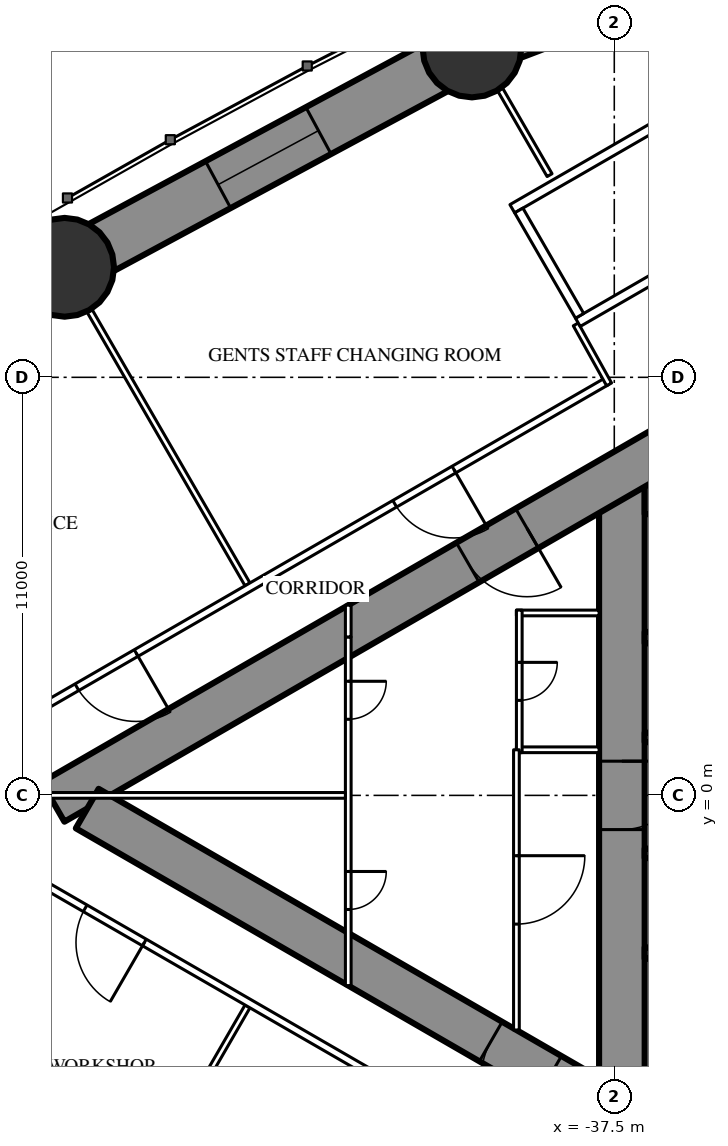
"""IFC4 building model, lengths in metres.
Left out: names, types, materials, properties, quantities, classifications, styles, units other than length and angle.
Written with IfcOpenShell. Run it as: python <this file> out.ifc"""

import sys

from ifc_helpers import new_model, si_unit, direction, frame, frame_2d, origin, origin_2d, place, context, subcontext, project, spatial, rectangle, hollow_circle, extrude, element, fill, save


model = new_model("IFC4")
c1 = context("Model", 3, precision=1e-05, world=origin(), true_north=direction((0.0, 1.0)))
c2 = subcontext(c1, "Body", "Model", "MODEL_VIEW")
j1 = project(units=[si_unit("LENGTHUNIT", "METRE"), si_unit("PLANEANGLEUNIT", "RADIAN")], contexts=[c1])
p1 = place(None, origin())
s1 = spatial("IfcSite", under=j1, at=p1, CompositionType="ELEMENT")
p2 = place(p1, origin())
s2 = spatial("IfcBuilding", under=s1, at=p2, CompositionType="ELEMENT")
p3 = place(p2, frame((0.0, 0.0, 143.1)))
s3 = spatial("IfcBuildingStorey", under=s2, at=p3, CompositionType="ELEMENT", Elevation=143.1)
for number, where, z_axis, x_axis in (
    (1, (-41.245, 19.666, 0.0), (0.0, 0.0, 1.0), (1.0, 0.0, 0.0)),
    (2, (-51.963, 13.895, 0.0), (0.0, 0.0, 1.0), (1.0, 0.0, 0.0)),
):
    element("IfcColumn", number, at=place(p3, frame(where, z_axis=z_axis, x_axis=x_axis)), inside=s3, PredefinedType="COLUMN", context=c2, shape_type="SweptSolid", body=[
        extrude(hollow_circle(Radius=1.3, WallThickness=0.1, at=origin_2d()), origin(), (0.0, 0.0, 1.0), 3.6),
    ])
p4 = place(p3, frame((-37.3, 8.6, 0.0), z_axis=(0.0, 0.0, 1.0), x_axis=(0.0, -1.0, 0.0)))
e3 = element("IfcWall", 3, at=p4, inside=s3, PredefinedType="SHEAR", context=c2, shape_type="SweptSolid", body=[
    extrude(rectangle(XDim=17.2, YDim=1.2, at=frame_2d((8.6, 0.0))), origin(), (0.0, 0.0, 1.0), 3.6),
])
p5 = place(p4, frame((7.7, 0.0, 0.0)))
e4 = element("IfcOpeningElement", 4, at=p5, cuts=e3, PredefinedType="OPENING", context=c2, shape_type="SweptSolid", body=[
    extrude(rectangle(XDim=1.8, YDim=2.2, at=frame_2d((0.9, 1.1))), frame((0.0, 0.61, 0.0), z_axis=(0.0, -1.0, 0.0), x_axis=(1.0, 0.0, 0.0)), (0.0, 0.0, 1.0), 1.22),
])
p6 = place(p3, frame((-28.3, 8.0, 0.0), z_axis=(0.0, 0.0, 1.0), x_axis=(-1.0, 0.0, 0.0)))
e5 = element("IfcWall", 5, at=p6, inside=s3, PredefinedType="SHEAR", context=c2, shape_type="SweptSolid", body=[
    extrude(rectangle(XDim=8.4, YDim=1.2, at=frame_2d((4.2, 0.0))), origin(), (0.0, 0.0, 1.0), 3.6),
])
p7 = place(p6, frame((0.25, 0.0, 0.0)))
e6 = element("IfcOpeningElement", 6, at=p7, cuts=e5, PredefinedType="OPENING", context=c2, shape_type="SweptSolid", body=[
    extrude(rectangle(XDim=1.0, YDim=2.2, at=frame_2d((0.5, 1.1))), frame((0.0, 0.61, 0.0), z_axis=(0.0, -1.0, 0.0), x_axis=(1.0, 0.0, 0.0)), (0.0, 0.0, 1.0), 1.22),
])
for number, where, z_axis, x_axis in (
    (7, (-28.3, 4.15, 0.0), (0.0, 0.0, 1.0), (-1.0, 0.0, 0.0)),
    (8, (-28.3, -4.15, 0.0), (0.0, 0.0, 1.0), (-1.0, 0.0, 0.0)),
):
    element("IfcWall", number, at=place(p3, frame(where, z_axis=z_axis, x_axis=x_axis)), inside=s3, PredefinedType="SHEAR", context=c2, shape_type="SweptSolid", body=[
        extrude(rectangle(XDim=8.4, YDim=0.3, at=frame_2d((4.2, 0.0))), origin(), (0.0, 0.0, 1.0), 3.6),
    ])
for number, where, z_axis, x_axis in (
    (9, (-34.25, 1.525, 0.0), (0.0, 0.0, 1.0), (-1.0, 0.0, 0.0)),
    (10, (-34.25, -1.525, 0.0), (0.0, 0.0, 1.0), (-1.0, 0.0, 0.0)),
):
    element("IfcWall", number, at=place(p3, frame(where, z_axis=z_axis, x_axis=x_axis)), inside=s3, PredefinedType="SHEAR", context=c2, shape_type="SweptSolid", body=[
        extrude(rectangle(XDim=2.45, YDim=0.25, at=frame_2d((1.225, 0.0))), origin(), (0.0, 0.0, 1.0), 3.6),
    ])
p8 = place(p3, frame((-27.2, 14.3, 0.0), z_axis=(0.0, 0.0, 1.0), x_axis=(-0.866026593062, -0.499997940104, 0.0)))
e11 = element("IfcWall", 11, at=p8, inside=s3, PredefinedType="SHEAR", context=c2, shape_type="SweptSolid", body=[
    extrude(rectangle(XDim=28.946, YDim=1.2, at=frame_2d((14.473, 0.0))), origin(), (0.0, 0.0, 1.0), 3.6),
])
p9 = place(p8, frame((4.6, 0.0, 0.0)))
e12 = element("IfcOpeningElement", 12, at=p9, cuts=e11, PredefinedType="OPENING", context=c2, shape_type="SweptSolid", body=[
    extrude(rectangle(XDim=1.0, YDim=2.2, at=frame_2d((0.5, 1.1))), frame((0.0, 0.61, 0.0), z_axis=(0.0, -1.0, 0.0), x_axis=(1.0, 0.0, 0.0)), (0.0, 0.0, 1.0), 1.22),
])
p10 = place(p8, frame((14.545, 0.0, 0.0)))
e13 = element("IfcOpeningElement", 13, at=p10, cuts=e11, PredefinedType="OPENING", context=c2, shape_type="SweptSolid", body=[
    extrude(rectangle(XDim=1.8, YDim=2.2, at=frame_2d((0.9, 1.1))), frame((0.0, 0.61, 0.0), z_axis=(0.0, -1.0, 0.0), x_axis=(1.0, 0.0, 0.0)), (0.0, 0.0, 1.0), 1.22),
])
p11 = place(p3, frame((-27.2, -14.3, 0.0), z_axis=(0.0, 0.0, 1.0), x_axis=(-0.866024021859, 0.500002393557, 0.0)))
e14 = element("IfcWall", 14, at=p11, inside=s3, PredefinedType="SHEAR", context=c2, shape_type="SweptSolid", body=[
    extrude(rectangle(XDim=27.907, YDim=1.2, at=frame_2d((13.954, 0.0))), origin(), (0.0, 0.0, 1.0), 3.6),
])
p12 = place(p11, frame((4.6, 0.0, 0.0)))
e15 = element("IfcOpeningElement", 15, at=p12, cuts=e14, PredefinedType="OPENING", context=c2, shape_type="SweptSolid", body=[
    extrude(rectangle(XDim=1.0, YDim=2.2, at=frame_2d((0.5, 1.1))), frame((0.0, 0.61, 0.0), z_axis=(0.0, -1.0, 0.0), x_axis=(1.0, 0.0, 0.0)), (0.0, 0.0, 1.0), 1.22),
])
p13 = place(p11, frame((13.845, 0.0, 0.0)))
e16 = element("IfcOpeningElement", 16, at=p13, cuts=e14, PredefinedType="OPENING", context=c2, shape_type="SweptSolid", body=[
    extrude(rectangle(XDim=1.8, YDim=2.2, at=frame_2d((0.9, 1.1))), frame((0.0, 0.61, 0.0), z_axis=(0.0, -1.0, 0.0), x_axis=(1.0, 0.0, 0.0)), (0.0, 0.0, 1.0), 1.22),
])
p14 = place(p3, frame((-31.665, 23.318, 0.0), z_axis=(0.0, 0.0, 1.0), x_axis=(-0.934392266213, -0.356245832033, 0.0)))
e17 = element("IfcWall", 17, at=p14, inside=s3, PredefinedType="SHEAR", context=c2, shape_type="SweptSolid", body=[
    extrude(rectangle(XDim=10.253, YDim=1.4, at=frame_2d((5.126, 0.0))), origin(), (0.0, 0.0, 1.0), 3.6),
])
p15 = place(p14, frame((3.626, 0.0, 0.6)))
e18 = element("IfcOpeningElement", 18, at=p15, cuts=e17, PredefinedType="OPENING", context=c2, shape_type="SweptSolid", body=[
    extrude(rectangle(XDim=3.0, YDim=1.2, at=frame_2d((1.5, 0.6))), frame((0.0, 0.71, 0.0), z_axis=(0.0, -1.0, 0.0), x_axis=(1.0, 0.0, 0.0)), (0.0, 0.0, 1.0), 1.42),
])
p16 = place(p3, frame((-41.245, 19.666, 0.0), z_axis=(0.0, 0.0, 1.0), x_axis=(-0.880492350889, -0.474060354835, 0.0)))
e19 = element("IfcWall", 19, at=p16, inside=s3, PredefinedType="SHEAR", context=c2, shape_type="SweptSolid", body=[
    extrude(rectangle(XDim=12.173, YDim=1.4, at=frame_2d((6.086, 0.0))), origin(), (0.0, 0.0, 1.0), 3.6),
])
p17 = place(p16, frame((4.586, 0.0, 0.6)))
e20 = element("IfcOpeningElement", 20, at=p17, cuts=e19, PredefinedType="OPENING", context=c2, shape_type="SweptSolid", body=[
    extrude(rectangle(XDim=3.0, YDim=1.2, at=frame_2d((1.5, 0.6))), frame((0.0, 0.71, 0.0), z_axis=(0.0, -1.0, 0.0), x_axis=(1.0, 0.0, 0.0)), (0.0, 0.0, 1.0), 1.42),
])
p18 = place(p3, frame((-51.963, 13.895, 0.0), z_axis=(0.0, 0.0, 1.0), x_axis=(-0.848062521637, -0.529896177939, 0.0)))
e21 = element("IfcWall", 21, at=p18, inside=s3, PredefinedType="SHEAR", context=c2, shape_type="SweptSolid", body=[
    extrude(rectangle(XDim=12.173, YDim=1.4, at=frame_2d((6.086, 0.0))), origin(), (0.0, 0.0, 1.0), 3.6),
])
p19 = place(p18, frame((4.586, 0.0, 0.6)))
e22 = element("IfcOpeningElement", 22, at=p19, cuts=e21, PredefinedType="OPENING", context=c2, shape_type="SweptSolid", body=[
    extrude(rectangle(XDim=3.0, YDim=1.2, at=frame_2d((1.5, 0.6))), frame((0.0, 0.71, 0.0), z_axis=(0.0, -1.0, 0.0), x_axis=(1.0, 0.0, 0.0)), (0.0, 0.0, 1.0), 1.42),
])
p20 = place(p3, frame((-62.287, -7.445, 0.0), z_axis=(0.0, 0.0, 1.0), x_axis=(0.848062521637, -0.529896177939, 0.0)))
e23 = element("IfcWall", 23, at=p20, inside=s3, PredefinedType="SHEAR", context=c2, shape_type="SweptSolid", body=[
    extrude(rectangle(XDim=12.173, YDim=1.4, at=frame_2d((6.086, 0.0))), origin(), (0.0, 0.0, 1.0), 3.6),
])
p21 = place(p20, frame((4.586, 0.0, 0.6)))
e24 = element("IfcOpeningElement", 24, at=p21, cuts=e23, PredefinedType="OPENING", context=c2, shape_type="SweptSolid", body=[
    extrude(rectangle(XDim=3.0, YDim=1.2, at=frame_2d((1.5, 0.6))), frame((0.0, 0.71, 0.0), z_axis=(0.0, -1.0, 0.0), x_axis=(1.0, 0.0, 0.0)), (0.0, 0.0, 1.0), 1.42),
])
for number, where, z_axis, x_axis in (
    (25, (-47.151, 5.552, 0.0), (0.0, 0.0, 1.0), (-0.5, 0.866, 0.0)),
    (26, (-47.151, -5.552, 0.0), (0.0, 0.0, 1.0), (-0.5, -0.866, 0.0)),
):
    element("IfcWall", number, at=place(p3, frame(where, z_axis=z_axis, x_axis=x_axis)), inside=s3, PredefinedType="PARTITIONING", context=c2, shape_type="SweptSolid", body=[
        extrude(rectangle(XDim=8.311, YDim=0.15, at=frame_2d((4.156, 0.0))), origin(), (0.0, 0.0, 1.0), 2.15),
    ])
p22 = place(p3, frame((-39.202, 16.32, 0.0), z_axis=(0.0, 0.0, 1.0), x_axis=(-0.499947391036, 0.866055775454, 0.0)))
e27 = element("IfcWall", 27, at=p22, inside=s3, PredefinedType="PARTITIONING", context=c2, shape_type="SweptSolid", body=[
    extrude(rectangle(XDim=2.599, YDim=0.15, at=frame_2d((1.3, 0.0))), origin(), (0.0, 0.0, 1.0), 3.35),
])
p23 = place(p3, frame((-37.7, 10.894, 0.0), z_axis=(0.0, 0.0, 1.0), x_axis=(-0.866027905338, -0.499995667157, 0.0)))
e28 = element("IfcWall", 28, at=p23, inside=s3, PredefinedType="PARTITIONING", context=c2, shape_type="SweptSolid", body=[
    extrude(rectangle(XDim=21.787, YDim=0.2, at=frame_2d((10.894, 0.0))), origin(), (0.0, 0.0, 1.0), 3.35),
])
p24 = place(p23, frame((14.296, 0.0, 0.0)))
e29 = element("IfcOpeningElement", 29, at=p24, cuts=e28, PredefinedType="OPENING", context=c2, shape_type="SweptSolid", body=[
    extrude(rectangle(XDim=1.8, YDim=2.2, at=frame_2d((0.9, 1.1))), frame((0.0, 0.11, 0.0), z_axis=(0.0, -1.0, 0.0), x_axis=(1.0, 0.0, 0.0)), (0.0, 0.0, 1.0), 0.22),
])
p25 = place(p23, frame((19.399, 0.0, 0.0)))
e30 = element("IfcOpeningElement", 30, at=p25, cuts=e28, PredefinedType="OPENING", context=c2, shape_type="SweptSolid", body=[
    extrude(rectangle(XDim=1.8, YDim=2.14, at=frame_2d((0.9, 1.07))), frame((0.0, 0.11, 0.0), z_axis=(0.0, -1.0, 0.0), x_axis=(1.0, 0.0, 0.0)), (0.0, 0.0, 1.0), 0.22),
])
p26 = place(p23, frame((4.64, 0.0, 0.0)))
e31 = element("IfcOpeningElement", 31, at=p26, cuts=e28, PredefinedType="OPENING", context=c2, shape_type="SweptSolid", body=[
    extrude(rectangle(XDim=1.8, YDim=2.2, at=frame_2d((0.9, 1.1))), frame((0.0, 0.11, 0.0), z_axis=(0.0, -1.0, 0.0), x_axis=(1.0, 0.0, 0.0)), (0.0, 0.0, 1.0), 0.22),
])
p27 = place(p3, frame((-36.92, -11.344, 0.0), z_axis=(0.0, 0.0, 1.0), x_axis=(-0.866028313256, 0.499994960614, 0.0)))
e32 = element("IfcWall", 32, at=p27, inside=s3, PredefinedType="PARTITIONING", context=c2, shape_type="SweptSolid", body=[
    extrude(rectangle(XDim=22.568, YDim=0.2, at=frame_2d((11.284, 0.0))), origin(), (0.0, 0.0, 1.0), 3.35),
])
p28 = place(p27, frame((20.24, 0.0, 0.0)))
e33 = element("IfcOpeningElement", 33, at=p28, cuts=e32, PredefinedType="OPENING", context=c2, shape_type="SweptSolid", body=[
    extrude(rectangle(XDim=1.8, YDim=2.14, at=frame_2d((0.9, 1.07))), frame((0.0, 0.11, 0.0), z_axis=(0.0, -1.0, 0.0), x_axis=(1.0, 0.0, 0.0)), (0.0, 0.0, 1.0), 0.22),
])
p29 = place(p27, frame((14.946, 0.0, 0.0)))
e34 = element("IfcOpeningElement", 34, at=p29, cuts=e32, PredefinedType="OPENING", context=c2, shape_type="SweptSolid", body=[
    extrude(rectangle(XDim=1.8, YDim=2.2, at=frame_2d((0.9, 1.1))), frame((0.0, 0.11, 0.0), z_axis=(0.0, -1.0, 0.0), x_axis=(1.0, 0.0, 0.0)), (0.0, 0.0, 1.0), 0.22),
])
p30 = place(p27, frame((5.091, 0.0, 0.0)))
e35 = element("IfcOpeningElement", 35, at=p30, cuts=e32, PredefinedType="OPENING", context=c2, shape_type="SweptSolid", body=[
    extrude(rectangle(XDim=1.8, YDim=2.2, at=frame_2d((0.9, 1.1))), frame((0.0, 0.11, 0.0), z_axis=(0.0, -1.0, 0.0), x_axis=(1.0, 0.0, 0.0)), (0.0, 0.0, 1.0), 0.22),
])
p31 = place(p3, frame((-38.513, 12.392, 0.0), z_axis=(0.0, 0.0, 1.0), x_axis=(0.485585508183, -0.874189175317, 0.0)))
e36 = element("IfcWall", 36, at=p31, inside=s3, PredefinedType="PARTITIONING", context=c2, shape_type="SweptSolid", body=[
    extrude(rectangle(XDim=1.805, YDim=0.15, at=frame_2d((0.902, 0.0))), origin(), (0.0, 0.0, 1.0), 3.35),
])
for number, where, z_axis, x_axis in (
    (37, (-37.9, 1.2, 0.0), (0.0, 0.0, 1.0), (-1.0, 0.0, 0.0)),
    (38, (-37.9, 4.8, 0.0), (0.0, 0.0, 1.0), (-1.0, 0.0, 0.0)),
):
    element("IfcWall", number, at=place(p3, frame(where, z_axis=z_axis, x_axis=x_axis)), inside=s3, PredefinedType="PARTITIONING", context=c2, shape_type="SweptSolid", body=[
        extrude(rectangle(XDim=2.175, YDim=0.15, at=frame_2d((1.087, 0.0))), origin(), (0.0, 0.0, 1.0), 3.35),
    ])
p32 = place(p3, frame((-40.0, 4.875, 0.0), z_axis=(0.0, 0.0, 1.0), x_axis=(0.0, -1.0, 0.0)))
e39 = element("IfcWall", 39, at=p32, inside=s3, PredefinedType="PARTITIONING", context=c2, shape_type="SweptSolid", body=[
    extrude(rectangle(XDim=3.75, YDim=0.15, at=frame_2d((1.875, 0.0))), origin(), (0.0, 0.0, 1.0), 3.35),
])
p33 = place(p32, frame((1.375, 0.0, 0.0)))
e40 = element("IfcOpeningElement", 40, at=p33, cuts=e39, PredefinedType="OPENING", context=c2, shape_type="SweptSolid", body=[
    extrude(rectangle(XDim=1.0, YDim=2.2, at=frame_2d((0.5, 1.1))), frame((0.0, 0.085, 0.0), z_axis=(0.0, -1.0, 0.0), x_axis=(1.0, 0.0, 0.0)), (0.0, 0.0, 1.0), 0.17),
])
p34 = place(p3, frame((-40.075, 1.2, 0.0), z_axis=(0.0, 0.0, 1.0), x_axis=(0.0, -1.0, 0.0)))
e41 = element("IfcWall", 41, at=p34, inside=s3, PredefinedType="PARTITIONING", context=c2, shape_type="SweptSolid", body=[
    extrude(rectangle(XDim=7.374, YDim=0.15, at=frame_2d((3.687, 0.0))), origin(), (0.0, 0.0, 1.0), 3.35),
])
p35 = place(p34, frame((2.787, 0.0, 0.0)))
e42 = element("IfcOpeningElement", 42, at=p35, cuts=e41, PredefinedType="OPENING", context=c2, shape_type="SweptSolid", body=[
    extrude(rectangle(XDim=1.8, YDim=2.2, at=frame_2d((0.9, 1.1))), frame((0.0, 0.085, 0.0), z_axis=(0.0, -1.0, 0.0), x_axis=(1.0, 0.0, 0.0)), (0.0, 0.0, 1.0), 0.17),
])
p36 = place(p3, frame((-44.5, 4.169, 0.0), z_axis=(0.0, 0.0, 1.0), x_axis=(0.0, -1.0, 0.0)))
e43 = element("IfcWall", 43, at=p36, inside=s3, PredefinedType="PARTITIONING", context=c2, shape_type="SweptSolid", body=[
    extrude(rectangle(XDim=9.173, YDim=0.15, at=frame_2d((4.587, 0.0))), origin(), (0.0, 0.0, 1.0), 3.35),
])
p37 = place(p36, frame((1.167, 0.0, 0.0)))
e44 = element("IfcOpeningElement", 44, at=p37, cuts=e43, PredefinedType="OPENING", context=c2, shape_type="SweptSolid", body=[
    extrude(rectangle(XDim=1.0, YDim=2.2, at=frame_2d((0.5, 1.1))), frame((0.0, 0.085, 0.0), z_axis=(0.0, -1.0, 0.0), x_axis=(1.0, 0.0, 0.0)), (0.0, 0.0, 1.0), 0.17),
])
p38 = place(p36, frame((6.171, 0.0, 0.0)))
e45 = element("IfcOpeningElement", 45, at=p38, cuts=e43, PredefinedType="OPENING", context=c2, shape_type="SweptSolid", body=[
    extrude(rectangle(XDim=1.0, YDim=2.2, at=frame_2d((0.5, 1.1))), frame((0.0, 0.085, 0.0), z_axis=(0.0, -1.0, 0.0), x_axis=(1.0, 0.0, 0.0)), (0.0, 0.0, 1.0), 0.17),
])
p39 = place(p3, frame((-44.575, 0.0, 0.0), z_axis=(0.0, 0.0, 1.0), x_axis=(-1.0, 0.0, 0.0)))
e46 = element("IfcWall", 46, at=p39, inside=s3, PredefinedType="PARTITIONING", context=c2, shape_type="SweptSolid", body=[
    extrude(rectangle(XDim=8.593, YDim=0.15, at=frame_2d((4.297, 0.0))), origin(), (0.0, 0.0, 1.0), 2.15),
])
for number, where, z_axis, x_axis in (
    (47, (-31.01, 16.747, 0.0), (0.0, 0.0, 1.0), (-0.866, -0.5, 0.0)),
    (48, (-32.736, 19.736, 0.0), (0.0, 0.0, 1.0), (-0.866, -0.5, 0.0)),
):
    element("IfcWall", number, at=place(p3, frame(where, z_axis=z_axis, x_axis=x_axis)), inside=s3, PredefinedType="PARTITIONING", context=c2, shape_type="SweptSolid", body=[
        extrude(rectangle(XDim=8.6, YDim=0.25, at=frame_2d((4.3, 0.0))), origin(), (0.0, 0.0, 1.0), 3.35),
    ])
p40 = place(p3, frame((-38.413, 12.618, 0.0), z_axis=(0.0, 0.0, 1.0), x_axis=(-0.499872130319, 0.866099216793, 0.0)))
e49 = element("IfcWall", 49, at=p40, inside=s3, PredefinedType="PARTITIONING", context=c2, shape_type="SweptSolid", body=[
    extrude(rectangle(XDim=3.2, YDim=0.25, at=frame_2d((1.6, 0.0))), origin(), (0.0, 0.0, 1.0), 3.35),
])
p41 = place(p3, frame((-44.5, 5.005, 0.0), z_axis=(0.0, 0.0, 1.0), x_axis=(0.0, -1.0, 0.0)))
e50 = element("IfcWall", 50, at=p41, inside=s3, PredefinedType="PARTITIONING", context=c2, shape_type="SweptSolid", body=[
    extrude(rectangle(XDim=0.836, YDim=0.15, at=frame_2d((0.418, 0.0))), origin(), (0.0, 0.0, 1.0), 2.15),
])
p42 = place(p17, origin())
e51 = element("IfcWindow", 51, at=p42, inside=s3, PartitioningType="SINGLE_PANEL", PredefinedType="WINDOW", context=c2, shape_type="SweptSolid", body=[
    extrude(rectangle(XDim=3.0, YDim=1.2, at=frame_2d((1.5, 0.6))), frame((0.0, 0.03, 0.0), z_axis=(0.0, -1.0, 0.0), x_axis=(1.0, 0.0, 0.0)), (0.0, 0.0, 1.0), 0.06),
])
fill(e20, e51)
p43 = place(p24, origin())
e52 = element("IfcDoor", 52, at=p43, inside=s3, OperationType="DOUBLE_DOOR_SINGLE_SWING", PredefinedType="DOOR", context=c2, shape_type="SweptSolid", body=[
    extrude(rectangle(XDim=1.8, YDim=2.2, at=frame_2d((0.9, 1.1))), frame((0.0, 0.025, 0.0), z_axis=(0.0, -1.0, 0.0), x_axis=(1.0, 0.0, 0.0)), (0.0, 0.0, 1.0), 0.05),
])
fill(e29, e52)
p44 = place(p29, origin())
e53 = element("IfcDoor", 53, at=p44, inside=s3, OperationType="DOUBLE_DOOR_SINGLE_SWING", PredefinedType="DOOR", context=c2, shape_type="SweptSolid", body=[
    extrude(rectangle(XDim=1.8, YDim=2.2, at=frame_2d((0.9, 1.1))), frame((0.0, 0.025, 0.0), z_axis=(0.0, -1.0, 0.0), x_axis=(1.0, 0.0, 0.0)), (0.0, 0.0, 1.0), 0.05),
])
fill(e34, e53)
p45 = place(p26, origin())
e54 = element("IfcDoor", 54, at=p45, inside=s3, OperationType="DOUBLE_DOOR_SINGLE_SWING", PredefinedType="DOOR", context=c2, shape_type="SweptSolid", body=[
    extrude(rectangle(XDim=1.8, YDim=2.2, at=frame_2d((0.9, 1.1))), frame((0.0, 0.025, 0.0), z_axis=(0.0, -1.0, 0.0), x_axis=(1.0, 0.0, 0.0)), (0.0, 0.0, 1.0), 0.05),
])
fill(e31, e54)
p46 = place(p33, origin())
e55 = element("IfcDoor", 55, at=p46, inside=s3, OperationType="SINGLE_SWING_LEFT", PredefinedType="DOOR", context=c2, shape_type="SweptSolid", body=[
    extrude(rectangle(XDim=1.0, YDim=2.2, at=frame_2d((0.5, 1.1))), frame((0.0, 0.025, 0.0), z_axis=(0.0, -1.0, 0.0), x_axis=(1.0, 0.0, 0.0)), (0.0, 0.0, 1.0), 0.05),
])
fill(e40, e55)
p47 = place(p35, origin())
e56 = element("IfcDoor", 56, at=p47, inside=s3, OperationType="DOUBLE_DOOR_SINGLE_SWING", PredefinedType="DOOR", context=c2, shape_type="SweptSolid", body=[
    extrude(rectangle(XDim=1.8, YDim=2.2, at=frame_2d((0.9, 1.1))), frame((0.0, 0.025, 0.0), z_axis=(0.0, -1.0, 0.0), x_axis=(1.0, 0.0, 0.0)), (0.0, 0.0, 1.0), 0.05),
])
fill(e42, e56)
p48 = place(p37, origin())
e57 = element("IfcDoor", 57, at=p48, inside=s3, OperationType="SINGLE_SWING_LEFT", PredefinedType="DOOR", context=c2, shape_type="SweptSolid", body=[
    extrude(rectangle(XDim=1.0, YDim=2.2, at=frame_2d((0.5, 1.1))), frame((0.0, 0.025, 0.0), z_axis=(0.0, -1.0, 0.0), x_axis=(1.0, 0.0, 0.0)), (0.0, 0.0, 1.0), 0.05),
])
fill(e44, e57)
p49 = place(p38, origin())
e58 = element("IfcDoor", 58, at=p49, inside=s3, OperationType="SINGLE_SWING_LEFT", PredefinedType="DOOR", context=c2, shape_type="SweptSolid", body=[
    extrude(rectangle(XDim=1.0, YDim=2.2, at=frame_2d((0.5, 1.1))), frame((0.0, 0.025, 0.0), z_axis=(0.0, -1.0, 0.0), x_axis=(1.0, 0.0, 0.0)), (0.0, 0.0, 1.0), 0.05),
])
fill(e45, e58)
p50 = place(p10, origin())
e59 = element("IfcDoor", 59, at=p50, inside=s3, OperationType="DOUBLE_DOOR_SINGLE_SWING", PredefinedType="DOOR", context=c2, shape_type="SweptSolid", body=[
    extrude(rectangle(XDim=1.8, YDim=2.2, at=frame_2d((0.9, 1.1))), frame((0.0, 0.025, 0.0), z_axis=(0.0, -1.0, 0.0), x_axis=(1.0, 0.0, 0.0)), (0.0, 0.0, 1.0), 0.05),
])
fill(e13, e59)
p51 = place(p13, origin())
e60 = element("IfcDoor", 60, at=p51, inside=s3, OperationType="DOUBLE_DOOR_SINGLE_SWING", PredefinedType="DOOR", context=c2, shape_type="SweptSolid", body=[
    extrude(rectangle(XDim=1.8, YDim=2.2, at=frame_2d((0.9, 1.1))), frame((0.0, 0.025, 0.0), z_axis=(0.0, -1.0, 0.0), x_axis=(1.0, 0.0, 0.0)), (0.0, 0.0, 1.0), 0.05),
])
fill(e16, e60)
p52 = place(p5, origin())
e61 = element("IfcDoor", 61, at=p52, inside=s3, OperationType="DOUBLE_DOOR_SINGLE_SWING", PredefinedType="DOOR", context=c2, shape_type="SweptSolid", body=[
    extrude(rectangle(XDim=1.8, YDim=2.2, at=frame_2d((0.9, 1.1))), frame((0.0, 0.025, 0.0), z_axis=(0.0, -1.0, 0.0), x_axis=(1.0, 0.0, 0.0)), (0.0, 0.0, 1.0), 0.05),
])
fill(e4, e61)
save(model, sys.argv[1])
